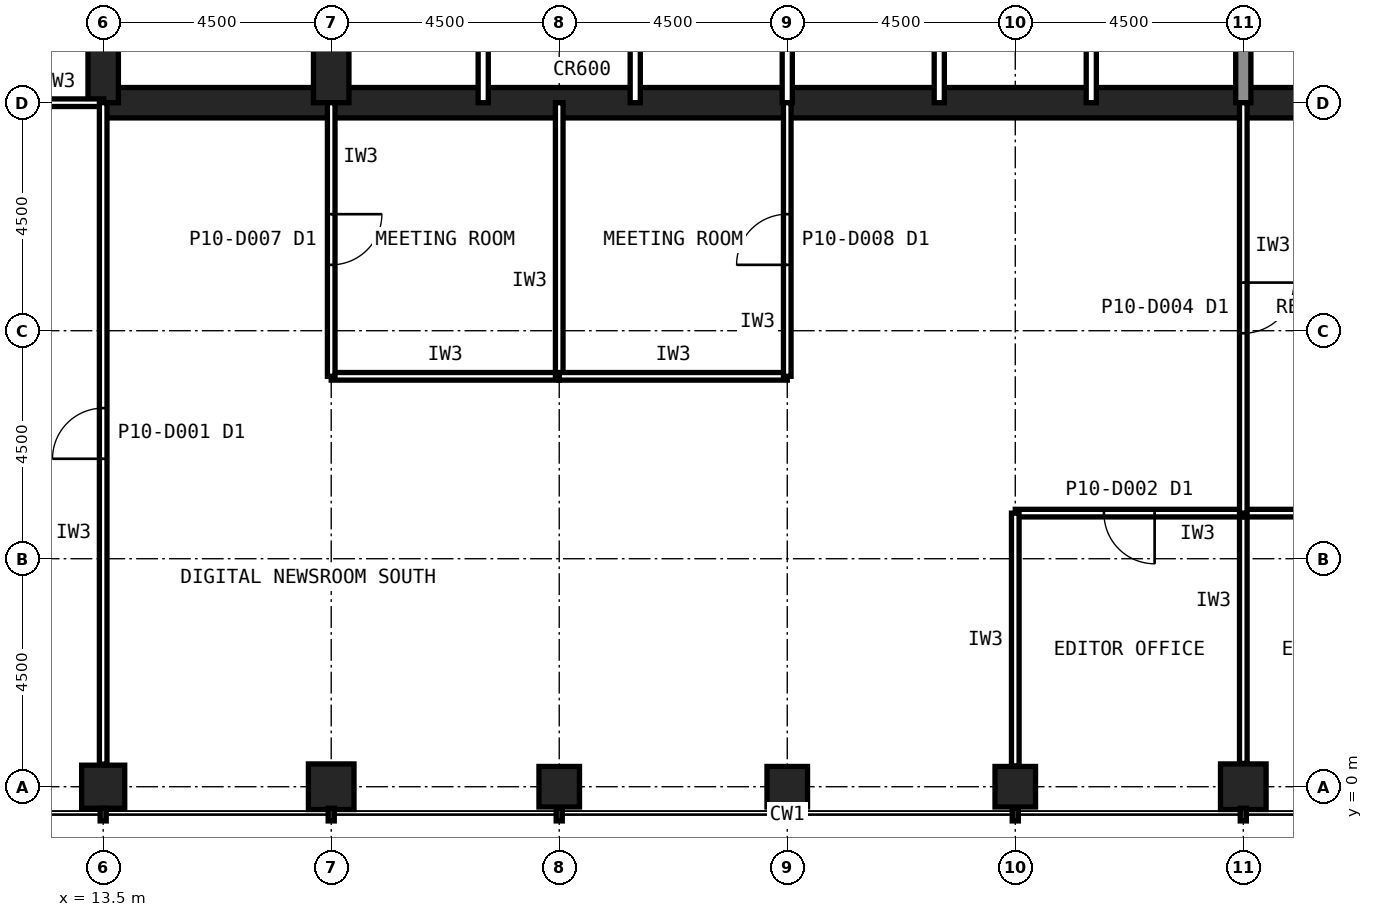
"""IFC4 building model, lengths in metres.
Left out: names, types, materials, properties, quantities, classifications, styles, units other than length and angle.
Written with IfcOpenShell. Run it as: python <this file> out.ifc"""

import sys

from ifc_helpers import new_model, si_unit, direction, frame, frame_2d, origin, origin_2d, place, context, subcontext, project, spatial, rectangle, hollow_rectangle, extrude, element, fill, save


model = new_model("IFC4")
c1 = context("Model", 3, precision=1e-05, world=origin(), true_north=direction((0.0, 1.0)))
c2 = subcontext(c1, "Body", "Model", "MODEL_VIEW")
j1 = project(units=[si_unit("LENGTHUNIT", "METRE"), si_unit("PLANEANGLEUNIT", "RADIAN")], contexts=[c1])
p1 = place(None, origin())
s1 = spatial("IfcSite", under=j1, at=p1, CompositionType="ELEMENT")
p2 = place(p1, origin())
s2 = spatial("IfcBuilding", under=s1, at=p2, CompositionType="ELEMENT")
p3 = place(p2, frame((0.0, 0.0, 45.8)))
s3 = spatial("IfcBuildingStorey", under=s2, at=p3, CompositionType="ELEMENT", Elevation=45.8)
p4 = place(p3, frame((13.5, 0.0, 0.0), z_axis=(0.0, 0.0, 1.0), x_axis=(1.0, 0.0, 0.0)))
e1 = element("IfcColumn", 1, at=p4, inside=s3, PredefinedType="COLUMN", context=c2, shape_type="SweptSolid", body=[
    extrude(hollow_rectangle(XDim=0.85, YDim=0.85, WallThickness=0.05, at=origin_2d()), origin(), (0.0, 0.0, 1.0), 4.2),
])
p5 = place(p3, frame((18.0, 0.0, 0.0), z_axis=(0.0, 0.0, 1.0), x_axis=(1.0, 0.0, 0.0)))
e2 = element("IfcColumn", 2, at=p5, inside=s3, PredefinedType="COLUMN", context=c2, shape_type="SweptSolid", body=[
    extrude(hollow_rectangle(XDim=0.9, YDim=0.9, WallThickness=0.063, at=origin_2d()), origin(), (0.0, 0.0, 1.0), 4.2),
])
for number, where, z_axis, x_axis in (
    (3, (22.5, 0.0, 0.0), (0.0, 0.0, 1.0), (1.0, 0.0, 0.0)),
    (4, (27.0, 0.0, 0.0), (0.0, 0.0, 1.0), (1.0, 0.0, 0.0)),
    (5, (31.5, 0.0, 0.0), (0.0, 0.0, 1.0), (1.0, 0.0, 0.0)),
):
    element("IfcColumn", number, at=place(p3, frame(where, z_axis=z_axis, x_axis=x_axis)), inside=s3, PredefinedType="COLUMN", context=c2, shape_type="SweptSolid", body=[
        extrude(hollow_rectangle(XDim=0.8, YDim=0.8, WallThickness=0.045, at=origin_2d()), origin(), (0.0, 0.0, 1.0), 4.2),
    ])
p6 = place(p3, frame((36.0, 0.0, 0.0), z_axis=(0.0, 0.0, 1.0), x_axis=(1.0, 0.0, 0.0)))
e6 = element("IfcColumn", 6, at=p6, inside=s3, PredefinedType="COLUMN", context=c2, shape_type="SweptSolid", body=[
    extrude(hollow_rectangle(XDim=0.9, YDim=0.9, WallThickness=0.063, at=origin_2d()), origin(), (0.0, 0.0, 1.0), 4.2),
])
p7 = place(p3, frame((13.5, 13.5, 0.0), z_axis=(0.0, 0.0, 1.0), x_axis=(1.0, 0.0, 0.0)))
e7 = element("IfcWall", 7, at=p7, inside=s3, PredefinedType="SHEAR", context=c2, shape_type="SweptSolid", body=[
    extrude(rectangle(XDim=27.0, YDim=0.6, at=frame_2d((13.5, 0.0))), origin(), (0.0, 0.0, 1.0), 4.2),
])
p8 = place(p3, frame((13.5, 40.5, 0.0), z_axis=(0.0, 0.0, 1.0), x_axis=(0.0, -1.0, 0.0)))
e8 = element("IfcWall", 8, at=p8, inside=s3, PredefinedType="SHEAR", context=c2, shape_type="SweptSolid", body=[
    extrude(rectangle(XDim=27.0, YDim=0.6, at=frame_2d((13.5, 0.0))), origin(), (0.0, 0.0, 1.0), 4.2),
])
p9 = place(p8, frame((19.65, 0.0, 0.0)))
e9 = element("IfcOpeningElement", 9, at=p9, cuts=e8, PredefinedType="OPENING", context=c2, shape_type="SweptSolid", body=[
    extrude(rectangle(XDim=1.2, YDim=2.1, at=frame_2d((0.6, 1.05))), frame((0.0, 0.31, 0.0), z_axis=(0.0, -1.0, 0.0), x_axis=(1.0, 0.0, 0.0)), (0.0, 0.0, 1.0), 0.62),
])
p10 = place(p8, frame((5.85, 0.0, 0.0)))
e10 = element("IfcOpeningElement", 10, at=p10, cuts=e8, PredefinedType="OPENING", context=c2, shape_type="SweptSolid", body=[
    extrude(rectangle(XDim=1.8, YDim=2.1, at=frame_2d((0.9, 1.05))), frame((0.0, 0.31, 0.0), z_axis=(0.0, -1.0, 0.0), x_axis=(1.0, 0.0, 0.0)), (0.0, 0.0, 1.0), 0.62),
])
p11 = place(p3, frame((18.0, 13.5, 0.0), z_axis=(0.0, 0.0, 1.0), x_axis=(0.0, 1.0, 0.0)))
e11 = element("IfcWall", 11, at=p11, inside=s3, PredefinedType="SHEAR", context=c2, shape_type="SweptSolid", body=[
    extrude(rectangle(XDim=18.0, YDim=0.7, at=frame_2d((9.0, 0.0))), origin(), (0.0, 0.0, 1.0), 4.2),
])
p12 = place(p3, frame((36.0, 13.5, 0.0), z_axis=(0.0, 0.0, 1.0), x_axis=(0.0, 1.0, 0.0)))
e12 = element("IfcWall", 12, at=p12, inside=s3, PredefinedType="SOLIDWALL", context=c2, shape_type="SweptSolid", body=[
    extrude(rectangle(XDim=4.5, YDim=0.3, at=frame_2d((2.25, 0.0))), origin(), (0.0, 0.0, 1.0), 4.04),
])
for number, where, z_axis, x_axis in (
    (13, (21.0, 13.5, 0.0), (0.0, 0.0, 1.0), (0.0, 1.0, 0.0)),
    (14, (24.0, 13.5, 0.0), (0.0, 0.0, 1.0), (0.0, 1.0, 0.0)),
    (15, (27.0, 13.5, 0.0), (0.0, 0.0, 1.0), (0.0, 1.0, 0.0)),
    (16, (30.0, 13.5, 0.0), (0.0, 0.0, 1.0), (0.0, 1.0, 0.0)),
    (17, (33.0, 13.5, 0.0), (0.0, 0.0, 1.0), (0.0, 1.0, 0.0)),
):
    element("IfcWall", number, at=place(p3, frame(where, z_axis=z_axis, x_axis=x_axis)), inside=s3, PredefinedType="PARTITIONING", context=c2, shape_type="SweptSolid", body=[
        extrude(rectangle(XDim=4.5, YDim=0.2, at=frame_2d((2.25, 0.0))), origin(), (0.0, 0.0, 1.0), 4.04),
    ])
p13 = place(p3, frame((11.7, 13.5, 0.0), z_axis=(0.0, 0.0, 1.0), x_axis=(1.0, 0.0, 0.0)))
e18 = element("IfcWall", 18, at=p13, inside=s3, PredefinedType="PARTITIONING", context=c2, shape_type="SweptSolid", body=[
    extrude(rectangle(XDim=1.81, YDim=0.15, at=frame_2d((0.905, 0.0))), origin(), (0.0, 0.0, 1.0), 3.189),
])
p14 = place(p3, frame((18.0, 8.1, 0.0), z_axis=(0.0, 0.0, 1.0), x_axis=(1.0, 0.0, 0.0)))
e19 = element("IfcWall", 19, at=p14, inside=s3, PredefinedType="PARTITIONING", context=c2, shape_type="SweptSolid", body=[
    extrude(rectangle(XDim=4.5, YDim=0.15, at=frame_2d((2.25, 0.0))), origin(), (0.0, 0.0, 1.0), 4.04),
])
p15 = place(p3, frame((22.5, 8.1, 0.0), z_axis=(0.0, 0.0, 1.0), x_axis=(0.0, 1.0, 0.0)))
e20 = element("IfcWall", 20, at=p15, inside=s3, PredefinedType="PARTITIONING", context=c2, shape_type="SweptSolid", body=[
    extrude(rectangle(XDim=5.4, YDim=0.15, at=frame_2d((2.7, 0.0))), origin(), (0.0, 0.0, 1.0), 3.189),
])
p16 = place(p3, frame((18.0, 13.5, 0.0), z_axis=(0.0, 0.0, 1.0), x_axis=(0.0, -1.0, 0.0)))
e21 = element("IfcWall", 21, at=p16, inside=s3, PredefinedType="PARTITIONING", context=c2, shape_type="SweptSolid", body=[
    extrude(rectangle(XDim=5.4, YDim=0.15, at=frame_2d((2.7, 0.0))), origin(), (0.0, 0.0, 1.0), 3.189),
])
p17 = place(p16, frame((2.2, 0.0, 0.0)))
e22 = element("IfcOpeningElement", 22, at=p17, cuts=e21, PredefinedType="OPENING", context=c2, shape_type="SweptSolid", body=[
    extrude(rectangle(XDim=1.0, YDim=2.1, at=frame_2d((0.5, 1.05))), frame((0.0, 0.085, 0.0), z_axis=(0.0, -1.0, 0.0), x_axis=(1.0, 0.0, 0.0)), (0.0, 0.0, 1.0), 0.17),
])
p18 = place(p3, frame((22.5, 8.1, 0.0), z_axis=(0.0, 0.0, 1.0), x_axis=(1.0, 0.0, 0.0)))
e23 = element("IfcWall", 23, at=p18, inside=s3, PredefinedType="PARTITIONING", context=c2, shape_type="SweptSolid", body=[
    extrude(rectangle(XDim=4.5, YDim=0.15, at=frame_2d((2.25, 0.0))), origin(), (0.0, 0.0, 1.0), 4.04),
])
p19 = place(p3, frame((27.0, 8.1, 0.0), z_axis=(0.0, 0.0, 1.0), x_axis=(0.0, 1.0, 0.0)))
e24 = element("IfcWall", 24, at=p19, inside=s3, PredefinedType="PARTITIONING", context=c2, shape_type="SweptSolid", body=[
    extrude(rectangle(XDim=5.4, YDim=0.15, at=frame_2d((2.7, 0.0))), origin(), (0.0, 0.0, 1.0), 3.189),
])
p20 = place(p19, frame((2.2, 0.0, 0.0)))
e25 = element("IfcOpeningElement", 25, at=p20, cuts=e24, PredefinedType="OPENING", context=c2, shape_type="SweptSolid", body=[
    extrude(rectangle(XDim=1.0, YDim=2.1, at=frame_2d((0.5, 1.05))), frame((0.0, 0.085, 0.0), z_axis=(0.0, -1.0, 0.0), x_axis=(1.0, 0.0, 0.0)), (0.0, 0.0, 1.0), 0.17),
])
p21 = place(p3, frame((36.0, 0.46, 0.0), z_axis=(0.0, 0.0, 1.0), x_axis=(0.0, 1.0, 0.0)))
e26 = element("IfcWall", 26, at=p21, inside=s3, PredefinedType="PARTITIONING", context=c2, shape_type="SweptSolid", body=[
    extrude(rectangle(XDim=4.94, YDim=0.15, at=frame_2d((2.47, 0.0))), origin(), (0.0, 0.0, 1.0), 3.189),
])
p22 = place(p3, frame((36.0, 5.4, 0.0), z_axis=(0.0, 0.0, 1.0), x_axis=(-1.0, 0.0, 0.0)))
e27 = element("IfcWall", 27, at=p22, inside=s3, PredefinedType="PARTITIONING", context=c2, shape_type="SweptSolid", body=[
    extrude(rectangle(XDim=4.5, YDim=0.15, at=frame_2d((2.25, 0.0))), origin(), (0.0, 0.0, 1.0), 4.04),
])
p23 = place(p22, frame((1.75, 0.0, 0.0)))
e28 = element("IfcOpeningElement", 28, at=p23, cuts=e27, PredefinedType="OPENING", context=c2, shape_type="SweptSolid", body=[
    extrude(rectangle(XDim=1.0, YDim=2.1, at=frame_2d((0.5, 1.05))), frame((0.0, 0.085, 0.0), z_axis=(0.0, -1.0, 0.0), x_axis=(1.0, 0.0, 0.0)), (0.0, 0.0, 1.0), 0.17),
])
p24 = place(p3, frame((31.5, 5.4, 0.0), z_axis=(0.0, 0.0, 1.0), x_axis=(0.0, -1.0, 0.0)))
e29 = element("IfcWall", 29, at=p24, inside=s3, PredefinedType="PARTITIONING", context=c2, shape_type="SweptSolid", body=[
    extrude(rectangle(XDim=4.99, YDim=0.15, at=frame_2d((2.495, 0.0))), origin(), (0.0, 0.0, 1.0), 3.189),
])
p25 = place(p3, frame((40.5, 5.4, 0.0), z_axis=(0.0, 0.0, 1.0), x_axis=(-1.0, 0.0, 0.0)))
e30 = element("IfcWall", 30, at=p25, inside=s3, PredefinedType="PARTITIONING", context=c2, shape_type="SweptSolid", body=[
    extrude(rectangle(XDim=4.5, YDim=0.15, at=frame_2d((2.25, 0.0))), origin(), (0.0, 0.0, 1.0), 4.04),
])
p26 = place(p25, frame((1.75, 0.0, 0.0)))
e31 = element("IfcOpeningElement", 31, at=p26, cuts=e30, PredefinedType="OPENING", context=c2, shape_type="SweptSolid", body=[
    extrude(rectangle(XDim=1.0, YDim=2.1, at=frame_2d((0.5, 1.05))), frame((0.0, 0.085, 0.0), z_axis=(0.0, -1.0, 0.0), x_axis=(1.0, 0.0, 0.0)), (0.0, 0.0, 1.0), 0.17),
])
p27 = place(p3, frame((13.5, 0.445, 0.0), z_axis=(0.0, 0.0, 1.0), x_axis=(0.0, 1.0, 0.0)))
e32 = element("IfcWall", 32, at=p27, inside=s3, PredefinedType="PARTITIONING", context=c2, shape_type="SweptSolid", body=[
    extrude(rectangle(XDim=13.055, YDim=0.15, at=frame_2d((6.527, 0.0))), origin(), (0.0, 0.0, 1.0), 3.189),
])
p28 = place(p27, frame((6.028, 0.0, 0.0)))
e33 = element("IfcOpeningElement", 33, at=p28, cuts=e32, PredefinedType="OPENING", context=c2, shape_type="SweptSolid", body=[
    extrude(rectangle(XDim=1.0, YDim=2.1, at=frame_2d((0.5, 1.05))), frame((0.0, 0.085, 0.0), z_axis=(0.0, -1.0, 0.0), x_axis=(1.0, 0.0, 0.0)), (0.0, 0.0, 1.0), 0.17),
])
p29 = place(p3, frame((36.0, 13.5, 0.0), z_axis=(0.0, 0.0, 1.0), x_axis=(0.0, -1.0, 0.0)))
e34 = element("IfcWall", 34, at=p29, inside=s3, PredefinedType="PARTITIONING", context=c2, shape_type="SweptSolid", body=[
    extrude(rectangle(XDim=8.1, YDim=0.15, at=frame_2d((4.05, 0.0))), origin(), (0.0, 0.0, 1.0), 3.189),
])
p30 = place(p29, frame((3.55, 0.0, 0.0)))
e35 = element("IfcOpeningElement", 35, at=p30, cuts=e34, PredefinedType="OPENING", context=c2, shape_type="SweptSolid", body=[
    extrude(rectangle(XDim=1.0, YDim=2.1, at=frame_2d((0.5, 1.05))), frame((0.0, 0.085, 0.0), z_axis=(0.0, -1.0, 0.0), x_axis=(1.0, 0.0, 0.0)), (0.0, 0.0, 1.0), 0.17),
])
p31 = place(p17, origin())
e36 = element("IfcDoor", 36, at=p31, inside=s3, OperationType="SINGLE_SWING_LEFT", PredefinedType="DOOR", context=c2, shape_type="SweptSolid", body=[
    extrude(rectangle(XDim=1.0, YDim=2.1, at=frame_2d((0.5, 1.05))), frame((0.0, 0.025, 0.0), z_axis=(0.0, -1.0, 0.0), x_axis=(1.0, 0.0, 0.0)), (0.0, 0.0, 1.0), 0.05),
])
fill(e22, e36)
p32 = place(p20, origin())
e37 = element("IfcDoor", 37, at=p32, inside=s3, OperationType="SINGLE_SWING_LEFT", PredefinedType="DOOR", context=c2, shape_type="SweptSolid", body=[
    extrude(rectangle(XDim=1.0, YDim=2.1, at=frame_2d((0.5, 1.05))), frame((0.0, 0.025, 0.0), z_axis=(0.0, -1.0, 0.0), x_axis=(1.0, 0.0, 0.0)), (0.0, 0.0, 1.0), 0.05),
])
fill(e25, e37)
p33 = place(p23, origin())
e38 = element("IfcDoor", 38, at=p33, inside=s3, OperationType="SINGLE_SWING_LEFT", PredefinedType="DOOR", context=c2, shape_type="SweptSolid", body=[
    extrude(rectangle(XDim=1.0, YDim=2.1, at=frame_2d((0.5, 1.05))), frame((0.0, 0.025, 0.0), z_axis=(0.0, -1.0, 0.0), x_axis=(1.0, 0.0, 0.0)), (0.0, 0.0, 1.0), 0.05),
])
fill(e28, e38)
p34 = place(p28, origin())
e39 = element("IfcDoor", 39, at=p34, inside=s3, OperationType="SINGLE_SWING_LEFT", PredefinedType="DOOR", context=c2, shape_type="SweptSolid", body=[
    extrude(rectangle(XDim=1.0, YDim=2.1, at=frame_2d((0.5, 1.05))), frame((0.0, 0.025, 0.0), z_axis=(0.0, -1.0, 0.0), x_axis=(1.0, 0.0, 0.0)), (0.0, 0.0, 1.0), 0.05),
])
fill(e33, e39)
p35 = place(p30, origin())
e40 = element("IfcDoor", 40, at=p35, inside=s3, OperationType="SINGLE_SWING_LEFT", PredefinedType="DOOR", context=c2, shape_type="SweptSolid", body=[
    extrude(rectangle(XDim=1.0, YDim=2.1, at=frame_2d((0.5, 1.05))), frame((0.0, 0.025, 0.0), z_axis=(0.0, -1.0, 0.0), x_axis=(1.0, 0.0, 0.0)), (0.0, 0.0, 1.0), 0.05),
])
fill(e35, e40)
save(model, sys.argv[1])
